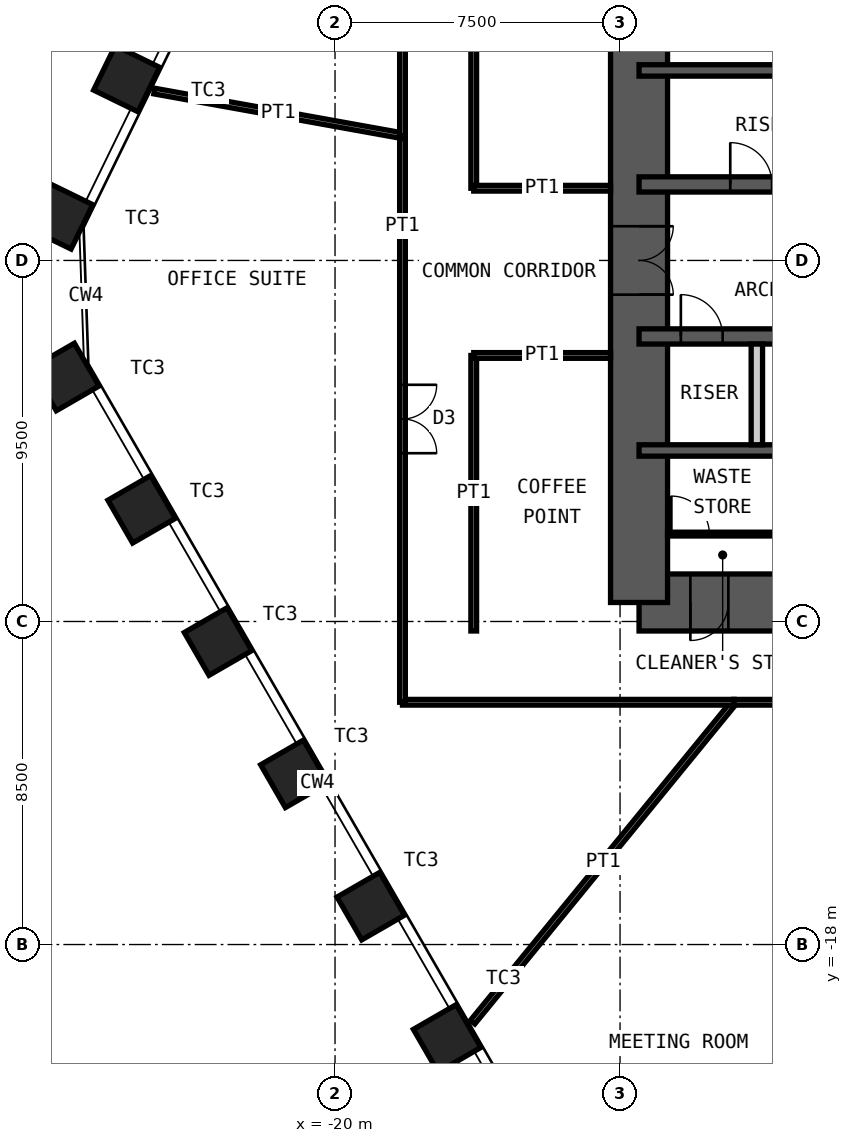
"""IFC4 building model, lengths in metres.
Left out: names, types, materials, properties, quantities, classifications, styles, units other than length and angle.
Written with IfcOpenShell. Run it as: python <this file> out.ifc"""

import sys

from ifc_helpers import new_model, si_unit, direction, frame, frame_2d, origin, origin_2d, place, context, subcontext, project, spatial, rectangle, hollow_rectangle, extrude, element, fill, save


model = new_model("IFC4")
c1 = context("Model", 3, precision=1e-05, world=origin(), true_north=direction((0.0, 1.0)))
c2 = subcontext(c1, "Body", "Model", "MODEL_VIEW")
j1 = project(units=[si_unit("LENGTHUNIT", "METRE"), si_unit("PLANEANGLEUNIT", "RADIAN")], contexts=[c1])
p1 = place(None, origin())
s1 = spatial("IfcSite", under=j1, at=p1, CompositionType="ELEMENT")
p2 = place(p1, origin())
s2 = spatial("IfcBuilding", under=s1, at=p2, CompositionType="ELEMENT")
p3 = place(p2, frame((0.0, 0.0, 111.4)))
s3 = spatial("IfcBuildingStorey", under=s2, at=p3, CompositionType="ELEMENT", Elevation=111.4)
for number, where, z_axis, x_axis in (
    (1, (-17.049, -20.47, 0.0), (0.0, 0.0, 1.0), (0.5, -0.866, 0.0)),
    (2, (-19.059, -16.989, 0.0), (0.0, 0.0, 1.0), (0.5, -0.866, 0.0)),
    (3, (-21.068, -13.509, 0.0), (0.0, 0.0, 1.0), (0.5, -0.866, 0.0)),
    (4, (-23.078, -10.028, 0.0), (0.0, 0.0, 1.0), (0.5, -0.866, 0.0)),
    (5, (-25.087, -6.547, 0.0), (0.0, 0.0, 1.0), (0.5, -0.866, 0.0)),
    (6, (-27.097, -3.067, 0.0), (0.0, 0.0, 1.0), (0.5, -0.866, 0.0)),
    (7, (-27.245, 1.169, 0.0), (0.0, 0.0, 1.0), (-0.438, -0.899, 0.0)),
    (8, (-25.483, 4.781, 0.0), (0.0, 0.0, 1.0), (-0.438, -0.899, 0.0)),
):
    element("IfcColumn", number, at=place(p3, frame(where, z_axis=z_axis, x_axis=x_axis)), inside=s3, PredefinedType="COLUMN", context=c2, shape_type="SweptSolid", body=[
        extrude(hollow_rectangle(XDim=1.3, YDim=1.3, WallThickness=0.1, at=origin_2d()), origin(), (0.0, 0.0, 1.0), 4.2),
    ])
p4 = place(p3, frame((-12.0, -9.0, 0.0), z_axis=(0.0, 0.0, 1.0), x_axis=(1.0, 0.0, 0.0)))
e9 = element("IfcWall", 9, at=p4, inside=s3, PredefinedType="SHEAR", context=c2, shape_type="SweptSolid", body=[
    extrude(rectangle(XDim=24.0, YDim=1.5, at=frame_2d((12.0, 0.0))), origin(), (0.0, 0.0, 1.0), 4.2),
])
p5 = place(p4, frame((1.35, 0.0, 0.0)))
e10 = element("IfcOpeningElement", 10, at=p5, cuts=e9, PredefinedType="OPENING", context=c2, shape_type="SweptSolid", body=[
    extrude(rectangle(XDim=1.0, YDim=2.1, at=frame_2d((0.5, 1.05))), frame((0.0, 0.76, 0.0), z_axis=(0.0, -1.0, 0.0), x_axis=(1.0, 0.0, 0.0)), (0.0, 0.0, 1.0), 1.52),
])
p6 = place(p4, frame((5.325, 0.0, 0.0)))
e11 = element("IfcOpeningElement", 11, at=p6, cuts=e9, PredefinedType="OPENING", context=c2, shape_type="SweptSolid", body=[
    extrude(rectangle(XDim=1.15, YDim=2.1, at=frame_2d((0.575, 1.05))), frame((0.0, 0.76, 0.0), z_axis=(0.0, -1.0, 0.0), x_axis=(1.0, 0.0, 0.0)), (0.0, 0.0, 1.0), 1.52),
])
p7 = place(p4, frame((12.6, 0.0, 0.0)))
e12 = element("IfcOpeningElement", 12, at=p7, cuts=e9, PredefinedType="OPENING", context=c2, shape_type="SweptSolid", body=[
    extrude(rectangle(XDim=1.0, YDim=2.1, at=frame_2d((0.5, 1.05))), frame((0.0, 0.76, 0.0), z_axis=(0.0, -1.0, 0.0), x_axis=(1.0, 0.0, 0.0)), (0.0, 0.0, 1.0), 1.52),
])
p8 = place(p3, frame((-12.0, -9.0, 0.0), z_axis=(0.0, 0.0, 1.0), x_axis=(0.0, 1.0, 0.0)))
e13 = element("IfcWall", 13, at=p8, inside=s3, PredefinedType="SHEAR", context=c2, shape_type="SweptSolid", body=[
    extrude(rectangle(XDim=18.0, YDim=1.5, at=frame_2d((9.0, 0.0))), origin(), (0.0, 0.0, 1.0), 4.2),
])
p9 = place(p8, frame((8.1, 0.0, 0.0)))
e14 = element("IfcOpeningElement", 14, at=p9, cuts=e13, PredefinedType="OPENING", context=c2, shape_type="SweptSolid", body=[
    extrude(rectangle(XDim=1.8, YDim=2.1, at=frame_2d((0.9, 1.05))), frame((0.0, 0.76, 0.0), z_axis=(0.0, -1.0, 0.0), x_axis=(1.0, 0.0, 0.0)), (0.0, 0.0, 1.0), 1.52),
])
p10 = place(p3, frame((-12.0, 5.0, 0.0), z_axis=(0.0, 0.0, 1.0), x_axis=(1.0, 0.0, 0.0)))
e15 = element("IfcWall", 15, at=p10, inside=s3, PredefinedType="SHEAR", context=c2, shape_type="SweptSolid", body=[
    extrude(rectangle(XDim=24.0, YDim=0.3, at=frame_2d((12.0, 0.0))), origin(), (0.0, 0.0, 1.0), 4.2),
])
p11 = place(p3, frame((-12.0, 2.0, 0.0), z_axis=(0.0, 0.0, 1.0), x_axis=(1.0, 0.0, 0.0)))
e16 = element("IfcWall", 16, at=p11, inside=s3, PredefinedType="SHEAR", context=c2, shape_type="SweptSolid", body=[
    extrude(rectangle(XDim=24.0, YDim=0.4, at=frame_2d((12.0, 0.0))), origin(), (0.0, 0.0, 1.0), 4.2),
])
p12 = place(p11, frame((2.4, 0.0, 0.0)))
e17 = element("IfcOpeningElement", 17, at=p12, cuts=e16, PredefinedType="OPENING", context=c2, shape_type="SweptSolid", body=[
    extrude(rectangle(XDim=1.1, YDim=2.1, at=frame_2d((0.55, 1.05))), frame((0.0, 0.21, 0.0), z_axis=(0.0, -1.0, 0.0), x_axis=(1.0, 0.0, 0.0)), (0.0, 0.0, 1.0), 0.42),
])
p13 = place(p11, frame((22.0, 0.0, 0.0)))
e18 = element("IfcOpeningElement", 18, at=p13, cuts=e16, PredefinedType="OPENING", context=c2, shape_type="SweptSolid", body=[
    extrude(rectangle(XDim=1.1, YDim=2.1, at=frame_2d((0.55, 1.05))), frame((0.0, 0.21, 0.0), z_axis=(0.0, -1.0, 0.0), x_axis=(1.0, 0.0, 0.0)), (0.0, 0.0, 1.0), 0.42),
])
p14 = place(p11, frame((10.15, 0.0, 0.0)))
e19 = element("IfcOpeningElement", 19, at=p14, cuts=e16, PredefinedType="OPENING", context=c2, shape_type="SweptSolid", body=[
    extrude(rectangle(XDim=1.0, YDim=2.1, at=frame_2d((0.5, 1.05))), frame((0.0, 0.21, 0.0), z_axis=(0.0, -1.0, 0.0), x_axis=(1.0, 0.0, 0.0)), (0.0, 0.0, 1.0), 0.42),
])
p15 = place(p11, frame((6.9, 0.0, 0.0)))
e20 = element("IfcOpeningElement", 20, at=p15, cuts=e16, PredefinedType="OPENING", context=c2, shape_type="SweptSolid", body=[
    extrude(rectangle(XDim=1.0, YDim=2.1, at=frame_2d((0.5, 1.05))), frame((0.0, 0.21, 0.0), z_axis=(0.0, -1.0, 0.0), x_axis=(1.0, 0.0, 0.0)), (0.0, 0.0, 1.0), 0.42),
])
p16 = place(p11, frame((13.35, 0.0, 0.0)))
e21 = element("IfcOpeningElement", 21, at=p16, cuts=e16, PredefinedType="OPENING", context=c2, shape_type="SweptSolid", body=[
    extrude(rectangle(XDim=1.1, YDim=2.4, at=frame_2d((0.55, 1.2))), frame((0.0, 0.21, 0.0), z_axis=(0.0, -1.0, 0.0), x_axis=(1.0, 0.0, 0.0)), (0.0, 0.0, 1.0), 0.42),
])
p17 = place(p11, frame((16.15, 0.0, 0.0)))
e22 = element("IfcOpeningElement", 22, at=p17, cuts=e16, PredefinedType="OPENING", context=c2, shape_type="SweptSolid", body=[
    extrude(rectangle(XDim=1.1, YDim=2.4, at=frame_2d((0.55, 1.2))), frame((0.0, 0.21, 0.0), z_axis=(0.0, -1.0, 0.0), x_axis=(1.0, 0.0, 0.0)), (0.0, 0.0, 1.0), 0.42),
])
p18 = place(p11, frame((18.95, 0.0, 0.0)))
e23 = element("IfcOpeningElement", 23, at=p18, cuts=e16, PredefinedType="OPENING", context=c2, shape_type="SweptSolid", body=[
    extrude(rectangle(XDim=1.1, YDim=2.4, at=frame_2d((0.55, 1.2))), frame((0.0, 0.21, 0.0), z_axis=(0.0, -1.0, 0.0), x_axis=(1.0, 0.0, 0.0)), (0.0, 0.0, 1.0), 0.42),
])
p19 = place(p3, frame((-12.0, -2.0, 0.0), z_axis=(0.0, 0.0, 1.0), x_axis=(1.0, 0.0, 0.0)))
e24 = element("IfcWall", 24, at=p19, inside=s3, PredefinedType="SHEAR", context=c2, shape_type="SweptSolid", body=[
    extrude(rectangle(XDim=24.0, YDim=0.4, at=frame_2d((12.0, 0.0))), origin(), (0.0, 0.0, 1.0), 4.2),
])
p20 = place(p19, frame((1.1, 0.0, 0.0)))
e25 = element("IfcOpeningElement", 25, at=p20, cuts=e24, PredefinedType="OPENING", context=c2, shape_type="SweptSolid", body=[
    extrude(rectangle(XDim=1.1, YDim=2.1, at=frame_2d((0.55, 1.05))), frame((0.0, 0.21, 0.0), z_axis=(0.0, -1.0, 0.0), x_axis=(1.0, 0.0, 0.0)), (0.0, 0.0, 1.0), 0.42),
])
p21 = place(p19, frame((13.55, 0.0, 0.0)))
e26 = element("IfcOpeningElement", 26, at=p21, cuts=e24, PredefinedType="OPENING", context=c2, shape_type="SweptSolid", body=[
    extrude(rectangle(XDim=1.1, YDim=2.1, at=frame_2d((0.55, 1.05))), frame((0.0, 0.21, 0.0), z_axis=(0.0, -1.0, 0.0), x_axis=(1.0, 0.0, 0.0)), (0.0, 0.0, 1.0), 0.42),
])
p22 = place(p19, frame((20.7, 0.0, 0.0)))
e27 = element("IfcOpeningElement", 27, at=p22, cuts=e24, PredefinedType="OPENING", context=c2, shape_type="SweptSolid", body=[
    extrude(rectangle(XDim=1.1, YDim=2.1, at=frame_2d((0.55, 1.05))), frame((0.0, 0.21, 0.0), z_axis=(0.0, -1.0, 0.0), x_axis=(1.0, 0.0, 0.0)), (0.0, 0.0, 1.0), 0.42),
])
p23 = place(p19, frame((4.0, 0.0, 0.0)))
e28 = element("IfcOpeningElement", 28, at=p23, cuts=e24, PredefinedType="OPENING", context=c2, shape_type="SweptSolid", body=[
    extrude(rectangle(XDim=1.0, YDim=2.1, at=frame_2d((0.5, 1.05))), frame((0.0, 0.21, 0.0), z_axis=(0.0, -1.0, 0.0), x_axis=(1.0, 0.0, 0.0)), (0.0, 0.0, 1.0), 0.42),
])
p24 = place(p3, frame((-12.0, -5.0, 0.0), z_axis=(0.0, 0.0, 1.0), x_axis=(1.0, 0.0, 0.0)))
e29 = element("IfcWall", 29, at=p24, inside=s3, PredefinedType="SHEAR", context=c2, shape_type="SweptSolid", body=[
    extrude(rectangle(XDim=24.0, YDim=0.3, at=frame_2d((12.0, 0.0))), origin(), (0.0, 0.0, 1.0), 4.2),
])
p25 = place(p3, frame((-8.9, -4.85, 0.0), z_axis=(0.0, 0.0, 1.0), x_axis=(0.0, 1.0, 0.0)))
e30 = element("IfcWall", 30, at=p25, inside=s3, PredefinedType="PARTITIONING", context=c2, shape_type="SweptSolid", body=[
    extrude(rectangle(XDim=2.65, YDim=0.3, at=frame_2d((1.325, 0.0))), origin(), (0.0, 0.0, 1.0), 3.98),
])
p26 = place(p3, frame((-11.25, -7.2, 0.0), z_axis=(0.0, 0.0, 1.0), x_axis=(1.0, 0.0, 0.0)))
e31 = element("IfcWall", 31, at=p26, inside=s3, PredefinedType="PARTITIONING", context=c2, shape_type="SweptSolid", body=[
    extrude(rectangle(XDim=2.9, YDim=0.1, at=frame_2d((1.45, 0.0))), origin(), (0.0, 0.0, 1.0), 3.98),
])
p27 = place(p26, frame((0.1, 0.0, 0.0)))
e32 = element("IfcOpeningElement", 32, at=p27, cuts=e31, PredefinedType="OPENING", context=c2, shape_type="SweptSolid", body=[
    extrude(rectangle(XDim=1.0, YDim=2.4, at=frame_2d((0.5, 1.2))), frame((0.0, 0.06, 0.0), z_axis=(0.0, -1.0, 0.0), x_axis=(1.0, 0.0, 0.0)), (0.0, 0.0, 1.0), 0.12),
])
p28 = place(p3, frame((-16.38, -20.042, 0.0), z_axis=(0.0, 0.0, 1.0), x_axis=(0.632814540967, 0.774303400962, 0.0)))
e33 = element("IfcWall", 33, at=p28, inside=s3, PredefinedType="PARTITIONING", context=c2, shape_type="SweptSolid", body=[
    extrude(rectangle(XDim=10.871, YDim=0.15, at=frame_2d((5.435, 0.0))), origin(), (0.0, 0.0, 1.0), 3.33),
])
p29 = place(p3, frame((-9.501, -11.625, 0.0), z_axis=(0.0, 0.0, 1.0), x_axis=(-1.0, 0.0, 0.0)))
e34 = element("IfcWall", 34, at=p29, inside=s3, PredefinedType="PARTITIONING", context=c2, shape_type="SweptSolid", body=[
    extrude(rectangle(XDim=8.724, YDim=0.15, at=frame_2d((4.362, 0.0))), origin(), (0.0, 0.0, 1.0), 4.03),
])
p30 = place(p3, frame((-18.225, -11.625, 0.0), z_axis=(0.0, 0.0, 1.0), x_axis=(0.0, 1.0, 0.0)))
e35 = element("IfcWall", 35, at=p30, inside=s3, PredefinedType="PARTITIONING", context=c2, shape_type="SweptSolid", body=[
    extrude(rectangle(XDim=14.906, YDim=0.15, at=frame_2d((7.453, 0.0))), origin(), (0.0, 0.0, 1.0), 4.03),
])
p31 = place(p30, frame((6.553, 0.0, 0.0)))
e36 = element("IfcOpeningElement", 36, at=p31, cuts=e35, PredefinedType="OPENING", context=c2, shape_type="SweptSolid", body=[
    extrude(rectangle(XDim=1.8, YDim=2.4, at=frame_2d((0.9, 1.2))), frame((0.0, 0.085, 0.0), z_axis=(0.0, -1.0, 0.0), x_axis=(1.0, 0.0, 0.0)), (0.0, 0.0, 1.0), 0.17),
])
p32 = place(p3, frame((-24.755, 4.457, 0.0), z_axis=(0.0, 0.0, 1.0), x_axis=(0.984174598206, -0.177201467959, 0.0)))
e37 = element("IfcWall", 37, at=p32, inside=s3, PredefinedType="PARTITIONING", context=c2, shape_type="SweptSolid", body=[
    extrude(rectangle(XDim=6.635, YDim=0.15, at=frame_2d((3.318, 0.0))), origin(), (0.0, 0.0, 1.0), 3.33),
])
p33 = place(p3, frame((-18.225, 3.281, 0.0), z_axis=(0.0, 0.0, 1.0), x_axis=(0.0, 1.0, 0.0)))
e38 = element("IfcWall", 38, at=p33, inside=s3, PredefinedType="PARTITIONING", context=c2, shape_type="SweptSolid", body=[
    extrude(rectangle(XDim=8.344, YDim=0.15, at=frame_2d((4.172, 0.0))), origin(), (0.0, 0.0, 1.0), 4.03),
])
p34 = place(p3, frame((-3.497, -11.625, 0.0), z_axis=(0.0, 0.0, 1.0), x_axis=(-1.0, 0.0, 0.0)))
e39 = element("IfcWall", 39, at=p34, inside=s3, PredefinedType="PARTITIONING", context=c2, shape_type="SweptSolid", body=[
    extrude(rectangle(XDim=6.004, YDim=0.15, at=frame_2d((3.002, 0.0))), origin(), (0.0, 0.0, 1.0), 4.03),
])
p35 = place(p34, frame((2.502, 0.0, 0.0)))
e40 = element("IfcOpeningElement", 40, at=p35, cuts=e39, PredefinedType="OPENING", context=c2, shape_type="SweptSolid", body=[
    extrude(rectangle(XDim=1.0, YDim=2.4, at=frame_2d((0.5, 1.2))), frame((0.0, 0.085, 0.0), z_axis=(0.0, -1.0, 0.0), x_axis=(1.0, 0.0, 0.0)), (0.0, 0.0, 1.0), 0.17),
])
p36 = place(p3, frame((-16.35, 1.9, 0.0), z_axis=(0.0, 0.0, 1.0), x_axis=(0.0, 1.0, 0.0)))
e41 = element("IfcWall", 41, at=p36, inside=s3, PredefinedType="PARTITIONING", context=c2, shape_type="SweptSolid", body=[
    extrude(rectangle(XDim=7.85, YDim=0.15, at=frame_2d((3.925, 0.0))), origin(), (0.0, 0.0, 1.0), 4.03),
])
p37 = place(p3, frame((-12.75, 1.9, 0.0), z_axis=(0.0, 0.0, 1.0), x_axis=(-1.0, 0.0, 0.0)))
e42 = element("IfcWall", 42, at=p37, inside=s3, PredefinedType="PARTITIONING", context=c2, shape_type="SweptSolid", body=[
    extrude(rectangle(XDim=3.6, YDim=0.15, at=frame_2d((1.8, 0.0))), origin(), (0.0, 0.0, 1.0), 3.33),
])
p38 = place(p3, frame((-16.35, -9.75, 0.0), z_axis=(0.0, 0.0, 1.0), x_axis=(0.0, 1.0, 0.0)))
e43 = element("IfcWall", 43, at=p38, inside=s3, PredefinedType="PARTITIONING", context=c2, shape_type="SweptSolid", body=[
    extrude(rectangle(XDim=7.25, YDim=0.15, at=frame_2d((3.625, 0.0))), origin(), (0.0, 0.0, 1.0), 4.03),
])
p39 = place(p3, frame((-12.75, -2.5, 0.0), z_axis=(0.0, 0.0, 1.0), x_axis=(-1.0, 0.0, 0.0)))
e44 = element("IfcWall", 44, at=p39, inside=s3, PredefinedType="PARTITIONING", context=c2, shape_type="SweptSolid", body=[
    extrude(rectangle(XDim=3.6, YDim=0.15, at=frame_2d((1.8, 0.0))), origin(), (0.0, 0.0, 1.0), 3.33),
])
p40 = place(p5, origin())
e45 = element("IfcDoor", 45, at=p40, inside=s3, OperationType="SINGLE_SWING_LEFT", PredefinedType="DOOR", context=c2, shape_type="SweptSolid", body=[
    extrude(rectangle(XDim=1.0, YDim=2.1, at=frame_2d((0.5, 1.05))), frame((0.0, 0.025, 0.0), z_axis=(0.0, -1.0, 0.0), x_axis=(1.0, 0.0, 0.0)), (0.0, 0.0, 1.0), 0.05),
])
fill(e10, e45)
p41 = place(p12, origin())
e46 = element("IfcDoor", 46, at=p41, inside=s3, OperationType="SINGLE_SWING_RIGHT", PredefinedType="DOOR", context=c2, shape_type="SweptSolid", body=[
    extrude(rectangle(XDim=1.1, YDim=2.1, at=frame_2d((0.55, 1.05))), frame((0.0, 0.025, 0.0), z_axis=(0.0, -1.0, 0.0), x_axis=(1.0, 0.0, 0.0)), (0.0, 0.0, 1.0), 0.05),
])
fill(e17, e46)
p42 = place(p20, origin())
e47 = element("IfcDoor", 47, at=p42, inside=s3, OperationType="SINGLE_SWING_RIGHT", PredefinedType="DOOR", context=c2, shape_type="SweptSolid", body=[
    extrude(rectangle(XDim=1.1, YDim=2.1, at=frame_2d((0.55, 1.05))), frame((0.0, 0.025, 0.0), z_axis=(0.0, -1.0, 0.0), x_axis=(1.0, 0.0, 0.0)), (0.0, 0.0, 1.0), 0.05),
])
fill(e25, e47)
p43 = place(p9, origin())
e48 = element("IfcDoor", 48, at=p43, inside=s3, OperationType="DOUBLE_DOOR_DOUBLE_SWING", PredefinedType="DOOR", context=c2, shape_type="SweptSolid", body=[
    extrude(rectangle(XDim=1.8, YDim=2.1, at=frame_2d((0.9, 1.05))), frame((0.0, 0.025, 0.0), z_axis=(0.0, -1.0, 0.0), x_axis=(1.0, 0.0, 0.0)), (0.0, 0.0, 1.0), 0.05),
])
fill(e14, e48)
p44 = place(p27, origin())
e49 = element("IfcDoor", 49, at=p44, inside=s3, OperationType="SINGLE_SWING_RIGHT", PredefinedType="DOOR", context=c2, shape_type="SweptSolid", body=[
    extrude(rectangle(XDim=1.0, YDim=2.4, at=frame_2d((0.5, 1.2))), frame((0.0, 0.025, 0.0), z_axis=(0.0, -1.0, 0.0), x_axis=(1.0, 0.0, 0.0)), (0.0, 0.0, 1.0), 0.05),
])
fill(e32, e49)
p45 = place(p31, origin())
e50 = element("IfcDoor", 50, at=p45, inside=s3, OperationType="DOUBLE_DOOR_DOUBLE_SWING", PredefinedType="DOOR", context=c2, shape_type="SweptSolid", body=[
    extrude(rectangle(XDim=1.8, YDim=2.4, at=frame_2d((0.9, 1.2))), frame((0.0, 0.025, 0.0), z_axis=(0.0, -1.0, 0.0), x_axis=(1.0, 0.0, 0.0)), (0.0, 0.0, 1.0), 0.05),
])
fill(e36, e50)
save(model, sys.argv[1])
